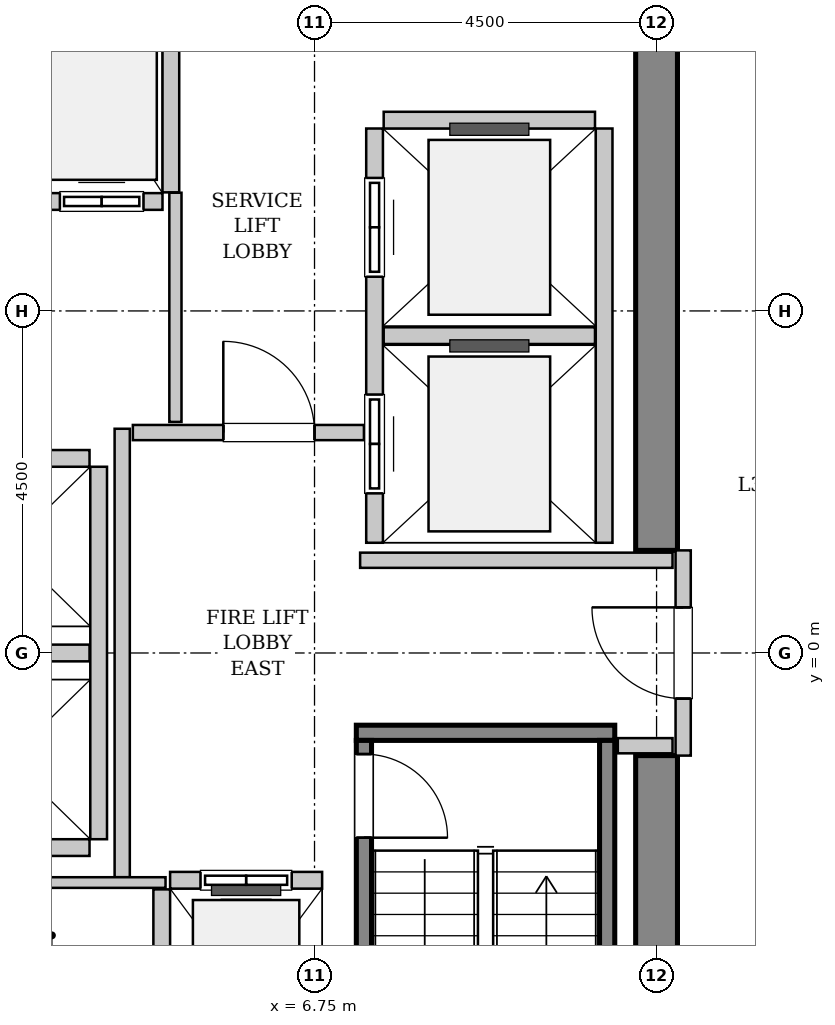
"""IFC4 building model, lengths in metres.
Left out: names, types, materials, properties, quantities, classifications, styles, units other than length and angle.
Written with IfcOpenShell. Run it as: python <this file> out.ifc"""

import sys

from ifc_helpers import new_model, si_unit, direction, frame, frame_2d, origin, place, context, subcontext, project, spatial, rectangle, extrude, source, transform, mapped, element, fill, save


model = new_model("IFC4")
c1 = context("Model", 3, precision=1e-05, world=origin(), true_north=direction((0.0, 1.0)))
c2 = subcontext(c1, "Body", "Model", "MODEL_VIEW")
j1 = project(units=[si_unit("LENGTHUNIT", "METRE"), si_unit("PLANEANGLEUNIT", "RADIAN")], contexts=[c1])
p1 = place(None, origin())
s1 = spatial("IfcSite", under=j1, at=p1, CompositionType="ELEMENT")
p2 = place(p1, origin())
s2 = spatial("IfcBuilding", under=s1, at=p2, CompositionType="ELEMENT")
p3 = place(p2, frame((0.0, 0.0, 136.4)))
s3 = spatial("IfcBuildingStorey", under=s2, at=p3, CompositionType="ELEMENT", Elevation=136.4)
m1 = source(origin(), c2, "Body", "SweptSolid", [
    extrude(rectangle(XDim=7.375, YDim=0.55, at=frame_2d((3.688, 0.0))), origin(), (0.0, 0.0, 1.0), 3.8),
])
for number, where, z_axis, x_axis in (
    (1, (11.25, -8.725, 0.0), (0.0, 0.0, 1.0), (0.0, 1.0, 0.0)),
    (2, (11.25, 1.35, 0.0), (0.0, 0.0, 1.0), (0.0, 1.0, 0.0)),
):
    element("IfcWall", number, at=place(p3, frame(where, z_axis=z_axis, x_axis=x_axis)), inside=s3, PredefinedType="SHEAR", context=c2, shape_type="MappedRepresentation", body=[
        mapped(m1, transform((0.0, 0.0, 0.0), x_axis=(1.0, 0.0, 0.0), y_axis=(0.0, 1.0, 0.0), z_axis=(0.0, 0.0, 1.0), scale=1.0)),
    ])
m2 = source(origin(), c2, "Body", "SweptSolid", [
    extrude(rectangle(XDim=3.4, YDim=0.2, at=frame_2d((1.7, 0.0))), origin(), (0.0, 0.0, 1.0), 3.8),
])
p4 = place(p3, frame((7.3, -1.05, 0.0), z_axis=(0.0, 0.0, 1.0), x_axis=(1.0, 0.0, 0.0)))
e3 = element("IfcWall", 3, at=p4, inside=s3, PredefinedType="SOLIDWALL", context=c2, shape_type="MappedRepresentation", body=[
    mapped(m2, transform((0.0, 0.0, 0.0), x_axis=(1.0, 0.0, 0.0), y_axis=(0.0, 1.0, 0.0), z_axis=(0.0, 0.0, 1.0), scale=1.0)),
])
m3 = source(origin(), c2, "Body", "SweptSolid", [
    extrude(rectangle(XDim=7.1, YDim=0.2, at=frame_2d((3.55, 0.0))), origin(), (0.0, 0.0, 1.0), 3.8),
])
p5 = place(p3, frame((7.4, -1.15, 0.0), z_axis=(0.0, 0.0, 1.0), x_axis=(0.0, -1.0, 0.0)))
e4 = element("IfcWall", 4, at=p5, inside=s3, PredefinedType="SOLIDWALL", context=c2, shape_type="MappedRepresentation", body=[
    mapped(m3, transform((0.0, 0.0, 0.0), x_axis=(1.0, 0.0, 0.0), y_axis=(0.0, 1.0, 0.0), z_axis=(0.0, 0.0, 1.0), scale=1.0)),
])
p6 = place(p5, frame((0.18, 0.0, 0.0)))
e5 = element("IfcOpeningElement", 5, at=p6, cuts=e4, PredefinedType="OPENING", context=c2, shape_type="SweptSolid", body=[
    extrude(rectangle(XDim=1.1, YDim=2.15, at=frame_2d((0.55, 1.075))), frame((0.0, 0.11, 0.0), z_axis=(0.0, -1.0, 0.0), x_axis=(1.0, 0.0, 0.0)), (0.0, 0.0, 1.0), 0.22),
])
p7 = place(p3, frame((10.6, -1.15, 0.0), z_axis=(0.0, 0.0, 1.0), x_axis=(0.0, -1.0, 0.0)))
e6 = element("IfcWall", 6, at=p7, inside=s3, PredefinedType="SOLIDWALL", context=c2, shape_type="MappedRepresentation", body=[
    mapped(m3, transform((0.0, 0.0, 0.0), x_axis=(1.0, 0.0, 0.0), y_axis=(0.0, 1.0, 0.0), z_axis=(0.0, 0.0, 1.0), scale=1.0)),
])
m4 = source(origin(), c2, "Body", "SweptSolid", [
    extrude(rectangle(XDim=2.0, YDim=0.22, at=frame_2d((1.0, 0.0))), origin(), (0.0, 0.0, 1.0), 3.535),
])
p8 = place(p3, frame((6.85, -2.99, 0.0), z_axis=(0.0, 0.0, 1.0), x_axis=(-1.0, 0.0, 0.0)))
e7 = element("IfcWall", 7, at=p8, inside=s3, PredefinedType="SOLIDWALL", context=c2, shape_type="MappedRepresentation", body=[
    mapped(m4, transform((0.0, 0.0, 0.0), x_axis=(1.0, 0.0, 0.0), y_axis=(0.0, 1.0, 0.0), z_axis=(0.0, 0.0, 1.0), scale=1.0)),
])
p9 = place(p8, frame((0.4, 0.0, 0.0)))
e8 = element("IfcOpeningElement", 8, at=p9, cuts=e7, PredefinedType="OPENING", context=c2, shape_type="SweptSolid", body=[
    extrude(rectangle(XDim=1.2, YDim=2.2, at=frame_2d((0.6, 1.1))), frame((0.0, 0.12, 0.0), z_axis=(0.0, -1.0, 0.0), x_axis=(1.0, 0.0, 0.0)), (0.0, 0.0, 1.0), 0.24),
])
m5 = source(origin(), c2, "Body", "SweptSolid", [
    extrude(rectangle(XDim=2.68, YDim=0.22, at=frame_2d((1.34, 0.0))), origin(), (0.0, 0.0, 1.0), 3.535),
])
p10 = place(p3, frame((4.74, -3.11, 0.0), z_axis=(0.0, 0.0, 1.0), x_axis=(0.0, -1.0, 0.0)))
e9 = element("IfcWall", 9, at=p10, inside=s3, PredefinedType="SOLIDWALL", context=c2, shape_type="MappedRepresentation", body=[
    mapped(m5, transform((0.0, 0.0, 0.0), x_axis=(1.0, 0.0, 0.0), y_axis=(0.0, 1.0, 0.0), z_axis=(0.0, 0.0, 1.0), scale=1.0)),
])
m6 = source(origin(), c2, "Body", "SweptSolid", [
    extrude(rectangle(XDim=5.45, YDim=0.22, at=frame_2d((2.725, 0.0))), origin(), (0.0, 0.0, 1.0), 3.535),
])
p11 = place(p3, frame((7.54, 6.9, 0.0), z_axis=(0.0, 0.0, 1.0), x_axis=(0.0, -1.0, 0.0)))
e10 = element("IfcWall", 10, at=p11, inside=s3, PredefinedType="SOLIDWALL", context=c2, shape_type="MappedRepresentation", body=[
    mapped(m6, transform((0.0, 0.0, 0.0), x_axis=(1.0, 0.0, 0.0), y_axis=(0.0, 1.0, 0.0), z_axis=(0.0, 0.0, 1.0), scale=1.0)),
])
p12 = place(p11, frame((3.5, 0.0, 0.0)))
e11 = element("IfcOpeningElement", 11, at=p12, cuts=e10, PredefinedType="OPENING", context=c2, shape_type="SweptSolid", body=[
    extrude(rectangle(XDim=1.3, YDim=2.3, at=frame_2d((0.65, 1.15))), frame((0.0, 0.12, 0.0), z_axis=(0.0, -1.0, 0.0), x_axis=(1.0, 0.0, 0.0)), (0.0, 0.0, 1.0), 0.24),
])
p13 = place(p11, frame((0.65, 0.0, 0.0)))
e12 = element("IfcOpeningElement", 12, at=p13, cuts=e10, PredefinedType="OPENING", context=c2, shape_type="SweptSolid", body=[
    extrude(rectangle(XDim=1.3, YDim=2.3, at=frame_2d((0.65, 1.15))), frame((0.0, 0.12, 0.0), z_axis=(0.0, -1.0, 0.0), x_axis=(1.0, 0.0, 0.0)), (0.0, 0.0, 1.0), 0.24),
])
p14 = place(p3, frame((10.56, 1.45, 0.0), z_axis=(0.0, 0.0, 1.0), x_axis=(0.0, 1.0, 0.0)))
e13 = element("IfcWall", 13, at=p14, inside=s3, PredefinedType="SOLIDWALL", context=c2, shape_type="MappedRepresentation", body=[
    mapped(m6, transform((0.0, 0.0, 0.0), x_axis=(1.0, 0.0, 0.0), y_axis=(0.0, 1.0, 0.0), z_axis=(0.0, 0.0, 1.0), scale=1.0)),
])
m7 = source(origin(), c2, "Body", "SweptSolid", [
    extrude(rectangle(XDim=2.78, YDim=0.22, at=frame_2d((1.39, 0.0))), origin(), (0.0, 0.0, 1.0), 3.535),
])
for number, where, z_axis, x_axis in (
    (14, (7.66, 4.175, 0.0), (0.0, 0.0, 1.0), (1.0, 0.0, 0.0)),
    (15, (10.44, 7.01, 0.0), (0.0, 0.0, 1.0), (-1.0, 0.0, 0.0)),
):
    element("IfcWall", number, at=place(p3, frame(where, z_axis=z_axis, x_axis=x_axis)), inside=s3, PredefinedType="SOLIDWALL", context=c2, shape_type="MappedRepresentation", body=[
        mapped(m7, transform((0.0, 0.0, 0.0), x_axis=(1.0, 0.0, 0.0), y_axis=(0.0, 1.0, 0.0), z_axis=(0.0, 0.0, 1.0), scale=1.0)),
    ])
m8 = source(origin(), c2, "Body", "SweptSolid", [
    extrude(rectangle(XDim=3.2, YDim=0.22, at=frame_2d((1.6, 0.0))), origin(), (0.0, 0.0, 1.0), 3.535),
])
p15 = place(p3, frame((1.55, 5.94, 0.0), z_axis=(0.0, 0.0, 1.0), x_axis=(1.0, 0.0, 0.0)))
e16 = element("IfcWall", 16, at=p15, inside=s3, PredefinedType="SOLIDWALL", context=c2, shape_type="MappedRepresentation", body=[
    mapped(m8, transform((0.0, 0.0, 0.0), x_axis=(1.0, 0.0, 0.0), y_axis=(0.0, 1.0, 0.0), z_axis=(0.0, 0.0, 1.0), scale=1.0)),
])
p16 = place(p15, frame((0.225, 0.0, 0.0)))
e17 = element("IfcOpeningElement", 17, at=p16, cuts=e16, PredefinedType="OPENING", context=c2, shape_type="SweptSolid", body=[
    extrude(rectangle(XDim=1.1, YDim=2.2, at=frame_2d((0.55, 1.1))), frame((0.0, 0.12, 0.0), z_axis=(0.0, -1.0, 0.0), x_axis=(1.0, 0.0, 0.0)), (0.0, 0.0, 1.0), 0.24),
])
p17 = place(p15, frame((1.85, 0.0, 0.0)))
e18 = element("IfcOpeningElement", 18, at=p17, cuts=e16, PredefinedType="OPENING", context=c2, shape_type="SweptSolid", body=[
    extrude(rectangle(XDim=1.1, YDim=2.2, at=frame_2d((0.55, 1.1))), frame((0.0, 0.12, 0.0), z_axis=(0.0, -1.0, 0.0), x_axis=(1.0, 0.0, 0.0)), (0.0, 0.0, 1.0), 0.24),
])
m9 = source(origin(), c2, "Body", "SweptSolid", [
    extrude(rectangle(XDim=2.43, YDim=0.22, at=frame_2d((1.215, 0.0))), origin(), (0.0, 0.0, 1.0), 3.535),
])
p18 = place(p3, frame((4.86, 6.06, 0.0), z_axis=(0.0, 0.0, 1.0), x_axis=(0.0, 1.0, 0.0)))
e19 = element("IfcWall", 19, at=p18, inside=s3, PredefinedType="SOLIDWALL", context=c2, shape_type="MappedRepresentation", body=[
    mapped(m9, transform((0.0, 0.0, 0.0), x_axis=(1.0, 0.0, 0.0), y_axis=(0.0, 1.0, 0.0), z_axis=(0.0, 0.0, 1.0), scale=1.0)),
])
m10 = source(origin(), c2, "Body", "SweptSolid", [
    extrude(rectangle(XDim=4.9, YDim=0.22, at=frame_2d((2.45, 0.0))), origin(), (0.0, 0.0, 1.0), 3.535),
])
p19 = place(p3, frame((3.91, -2.45, 0.0), z_axis=(0.0, 0.0, 1.0), x_axis=(0.0, 1.0, 0.0)))
e20 = element("IfcWall", 20, at=p19, inside=s3, PredefinedType="SOLIDWALL", context=c2, shape_type="MappedRepresentation", body=[
    mapped(m10, transform((0.0, 0.0, 0.0), x_axis=(1.0, 0.0, 0.0), y_axis=(0.0, 1.0, 0.0), z_axis=(0.0, 0.0, 1.0), scale=1.0)),
])
m11 = source(origin(), c2, "Body", "SweptSolid", [
    extrude(rectangle(XDim=2.13, YDim=0.22, at=frame_2d((1.065, 0.0))), origin(), (0.0, 0.0, 1.0), 3.535),
])
for number, where, z_axis, x_axis in (
    (21, (1.66, -2.56, 0.0), (0.0, 0.0, 1.0), (1.0, 0.0, 0.0)),
    (22, (1.66, 0.0, 0.0), (0.0, 0.0, 1.0), (1.0, 0.0, 0.0)),
    (23, (3.79, 2.56, 0.0), (0.0, 0.0, 1.0), (-1.0, 0.0, 0.0)),
):
    element("IfcWall", number, at=place(p3, frame(where, z_axis=z_axis, x_axis=x_axis)), inside=s3, PredefinedType="SOLIDWALL", context=c2, shape_type="MappedRepresentation", body=[
        mapped(m11, transform((0.0, 0.0, 0.0), x_axis=(1.0, 0.0, 0.0), y_axis=(0.0, 1.0, 0.0), z_axis=(0.0, 0.0, 1.0), scale=1.0)),
    ])
m12 = source(origin(), c2, "Body", "SweptSolid", [
    extrude(rectangle(XDim=2.7, YDim=0.2, at=frame_2d((1.35, 0.0))), origin(), (0.0, 0.0, 1.0), 2.425),
])
p20 = place(p3, frame((11.6, -1.35, 0.0), z_axis=(0.0, 0.0, 1.0), x_axis=(0.0, 1.0, 0.0)))
e24 = element("IfcWall", 24, at=p20, inside=s3, PredefinedType="PARTITIONING", context=c2, shape_type="MappedRepresentation", body=[
    mapped(m12, transform((0.0, 0.0, 0.0), x_axis=(1.0, 0.0, 0.0), y_axis=(0.0, 1.0, 0.0), z_axis=(0.0, 0.0, 1.0), scale=1.0)),
])
p21 = place(p20, frame((0.75, 0.0, 0.0)))
e25 = element("IfcOpeningElement", 25, at=p21, cuts=e24, PredefinedType="OPENING", context=c2, shape_type="SweptSolid", body=[
    extrude(rectangle(XDim=1.2, YDim=2.15, at=frame_2d((0.6, 1.075))), frame((0.0, 0.11, 0.0), z_axis=(0.0, -1.0, 0.0), x_axis=(1.0, 0.0, 0.0)), (0.0, 0.0, 1.0), 0.22),
])
m13 = source(origin(), c2, "Body", "SweptSolid", [
    extrude(rectangle(XDim=5.9, YDim=0.2, at=frame_2d((2.95, 0.0))), origin(), (0.0, 0.0, 1.0), 3.535),
])
p22 = place(p3, frame((4.22, -2.95, 0.0), z_axis=(0.0, 0.0, 1.0), x_axis=(0.0, 1.0, 0.0)))
e26 = element("IfcWall", 26, at=p22, inside=s3, PredefinedType="PARTITIONING", context=c2, shape_type="MappedRepresentation", body=[
    mapped(m13, transform((0.0, 0.0, 0.0), x_axis=(1.0, 0.0, 0.0), y_axis=(0.0, 1.0, 0.0), z_axis=(0.0, 0.0, 1.0), scale=1.0)),
])
m14 = source(origin(), c2, "Body", "SweptSolid", [
    extrude(rectangle(XDim=3.04, YDim=0.2, at=frame_2d((1.52, 0.0))), origin(), (0.0, 0.0, 1.0), 3.535),
])
p23 = place(p3, frame((4.36, 2.9, 0.0), z_axis=(0.0, 0.0, 1.0), x_axis=(1.0, 0.0, 0.0)))
e27 = element("IfcWall", 27, at=p23, inside=s3, PredefinedType="PARTITIONING", context=c2, shape_type="MappedRepresentation", body=[
    mapped(m14, transform((0.0, 0.0, 0.0), x_axis=(1.0, 0.0, 0.0), y_axis=(0.0, 1.0, 0.0), z_axis=(0.0, 0.0, 1.0), scale=1.0)),
])
p24 = place(p23, frame((1.19, 0.0, 0.0)))
e28 = element("IfcOpeningElement", 28, at=p24, cuts=e27, PredefinedType="OPENING", context=c2, shape_type="SweptSolid", body=[
    extrude(rectangle(XDim=1.2, YDim=2.15, at=frame_2d((0.6, 1.075))), frame((0.0, 0.11, 0.0), z_axis=(0.0, -1.0, 0.0), x_axis=(1.0, 0.0, 0.0)), (0.0, 0.0, 1.0), 0.22),
])
m15 = source(origin(), c2, "Body", "SweptSolid", [
    extrude(rectangle(XDim=4.11, YDim=0.2, at=frame_2d((2.055, 0.0))), origin(), (0.0, 0.0, 1.0), 3.535),
])
p25 = place(p3, frame((7.35, 1.22, 0.0), z_axis=(0.0, 0.0, 1.0), x_axis=(1.0, 0.0, 0.0)))
e29 = element("IfcWall", 29, at=p25, inside=s3, PredefinedType="PARTITIONING", context=c2, shape_type="MappedRepresentation", body=[
    mapped(m15, transform((0.0, 0.0, 0.0), x_axis=(1.0, 0.0, 0.0), y_axis=(0.0, 1.0, 0.0), z_axis=(0.0, 0.0, 1.0), scale=1.0)),
])
m16 = source(origin(), c2, "Body", "SweptSolid", [
    extrude(rectangle(XDim=0.72, YDim=0.2, at=frame_2d((0.36, 0.0))), origin(), (0.0, 0.0, 1.0), 3.535),
])
p26 = place(p3, frame((10.74, -1.22, 0.0), z_axis=(0.0, 0.0, 1.0), x_axis=(1.0, 0.0, 0.0)))
e30 = element("IfcWall", 30, at=p26, inside=s3, PredefinedType="PARTITIONING", context=c2, shape_type="MappedRepresentation", body=[
    mapped(m16, transform((0.0, 0.0, 0.0), x_axis=(1.0, 0.0, 0.0), y_axis=(0.0, 1.0, 0.0), z_axis=(0.0, 0.0, 1.0), scale=1.0)),
])
m17 = source(origin(), c2, "Body", "SweptSolid", [
    extrude(rectangle(XDim=3.015, YDim=0.16, at=frame_2d((1.507, 0.0))), origin(), (0.0, 0.0, 1.0), 3.535),
])
p27 = place(p3, frame((4.92, 3.04, 0.0), z_axis=(0.0, 0.0, 1.0), x_axis=(0.0, 1.0, 0.0)))
e31 = element("IfcWall", 31, at=p27, inside=s3, PredefinedType="PARTITIONING", context=c2, shape_type="MappedRepresentation", body=[
    mapped(m17, transform((0.0, 0.0, 0.0), x_axis=(1.0, 0.0, 0.0), y_axis=(0.0, 1.0, 0.0), z_axis=(0.0, 0.0, 1.0), scale=1.0)),
])
m18 = source(origin(), c2, "Body", "SweptSolid", [
    extrude(rectangle(XDim=3.15, YDim=0.14, at=frame_2d((1.575, 0.0))), origin(), (0.0, 0.0, 1.0), 3.535),
])
p28 = place(p3, frame((1.64, -3.02, 0.0), z_axis=(0.0, 0.0, 1.0), x_axis=(1.0, 0.0, 0.0)))
e32 = element("IfcWall", 32, at=p28, inside=s3, PredefinedType="PARTITIONING", context=c2, shape_type="MappedRepresentation", body=[
    mapped(m18, transform((0.0, 0.0, 0.0), x_axis=(1.0, 0.0, 0.0), y_axis=(0.0, 1.0, 0.0), z_axis=(0.0, 0.0, 1.0), scale=1.0)),
])
m19 = source(origin(), c2, "Body", "SweptSolid", [
    extrude(rectangle(XDim=1.1, YDim=2.15, at=frame_2d((0.55, 1.075))), frame((0.0, 0.025, 0.0), z_axis=(0.0, -1.0, 0.0), x_axis=(1.0, 0.0, 0.0)), (0.0, 0.0, 1.0), 0.05),
])
p29 = place(p6, origin())
e33 = element("IfcDoor", 33, at=p29, inside=s3, OperationType="SINGLE_SWING_RIGHT", PredefinedType="DOOR", context=c2, shape_type="MappedRepresentation", body=[
    mapped(m19, transform((0.0, 0.0, 0.0), x_axis=(1.0, 0.0, 0.0), y_axis=(0.0, 1.0, 0.0), z_axis=(0.0, 0.0, 1.0), scale=1.0)),
])
fill(e5, e33)
m20 = source(origin(), c2, "Body", "SweptSolid", [
    extrude(rectangle(XDim=1.2, YDim=2.2, at=frame_2d((0.6, 1.1))), frame((0.0, 0.025, 0.0), z_axis=(0.0, -1.0, 0.0), x_axis=(1.0, 0.0, 0.0)), (0.0, 0.0, 1.0), 0.05),
])
p30 = place(p9, origin())
e34 = element("IfcDoor", 34, at=p30, inside=s3, OperationType="SLIDING_TO_LEFT", PredefinedType="DOOR", context=c2, shape_type="MappedRepresentation", body=[
    mapped(m20, transform((0.0, 0.0, 0.0), x_axis=(1.0, 0.0, 0.0), y_axis=(0.0, 1.0, 0.0), z_axis=(0.0, 0.0, 1.0), scale=1.0)),
])
fill(e8, e34)
m21 = source(origin(), c2, "Body", "SweptSolid", [
    extrude(rectangle(XDim=1.3, YDim=2.3, at=frame_2d((0.65, 1.15))), frame((0.0, 0.025, 0.0), z_axis=(0.0, -1.0, 0.0), x_axis=(1.0, 0.0, 0.0)), (0.0, 0.0, 1.0), 0.05),
])
p31 = place(p12, origin())
e35 = element("IfcDoor", 35, at=p31, inside=s3, OperationType="SLIDING_TO_RIGHT", PredefinedType="DOOR", context=c2, shape_type="MappedRepresentation", body=[
    mapped(m21, transform((0.0, 0.0, 0.0), x_axis=(1.0, 0.0, 0.0), y_axis=(0.0, 1.0, 0.0), z_axis=(0.0, 0.0, 1.0), scale=1.0)),
])
fill(e11, e35)
p32 = place(p13, origin())
e36 = element("IfcDoor", 36, at=p32, inside=s3, OperationType="SLIDING_TO_RIGHT", PredefinedType="DOOR", context=c2, shape_type="MappedRepresentation", body=[
    mapped(m21, transform((0.0, 0.0, 0.0), x_axis=(1.0, 0.0, 0.0), y_axis=(0.0, 1.0, 0.0), z_axis=(0.0, 0.0, 1.0), scale=1.0)),
])
fill(e12, e36)
m22 = source(origin(), c2, "Body", "SweptSolid", [
    extrude(rectangle(XDim=1.1, YDim=2.2, at=frame_2d((0.55, 1.1))), frame((0.0, 0.025, 0.0), z_axis=(0.0, -1.0, 0.0), x_axis=(1.0, 0.0, 0.0)), (0.0, 0.0, 1.0), 0.05),
])
p33 = place(p17, origin())
e37 = element("IfcDoor", 37, at=p33, inside=s3, OperationType="DOUBLE_DOOR_SLIDING", PredefinedType="DOOR", context=c2, shape_type="MappedRepresentation", body=[
    mapped(m22, transform((0.0, 0.0, 0.0), x_axis=(1.0, 0.0, 0.0), y_axis=(0.0, 1.0, 0.0), z_axis=(0.0, 0.0, 1.0), scale=1.0)),
])
fill(e18, e37)
m23 = source(origin(), c2, "Body", "SweptSolid", [
    extrude(rectangle(XDim=1.2, YDim=2.15, at=frame_2d((0.6, 1.075))), frame((0.0, 0.025, 0.0), z_axis=(0.0, -1.0, 0.0), x_axis=(1.0, 0.0, 0.0)), (0.0, 0.0, 1.0), 0.05),
])
p34 = place(p21, origin())
e38 = element("IfcDoor", 38, at=p34, inside=s3, OperationType="SINGLE_SWING_RIGHT", PredefinedType="DOOR", context=c2, shape_type="MappedRepresentation", body=[
    mapped(m23, transform((0.0, 0.0, 0.0), x_axis=(1.0, 0.0, 0.0), y_axis=(0.0, 1.0, 0.0), z_axis=(0.0, 0.0, 1.0), scale=1.0)),
])
fill(e25, e38)
p35 = place(p24, origin())
e39 = element("IfcDoor", 39, at=p35, inside=s3, OperationType="SINGLE_SWING_LEFT", PredefinedType="DOOR", context=c2, shape_type="MappedRepresentation", body=[
    mapped(m23, transform((0.0, 0.0, 0.0), x_axis=(1.0, 0.0, 0.0), y_axis=(0.0, 1.0, 0.0), z_axis=(0.0, 0.0, 1.0), scale=1.0)),
])
fill(e28, e39)
save(model, sys.argv[1])
